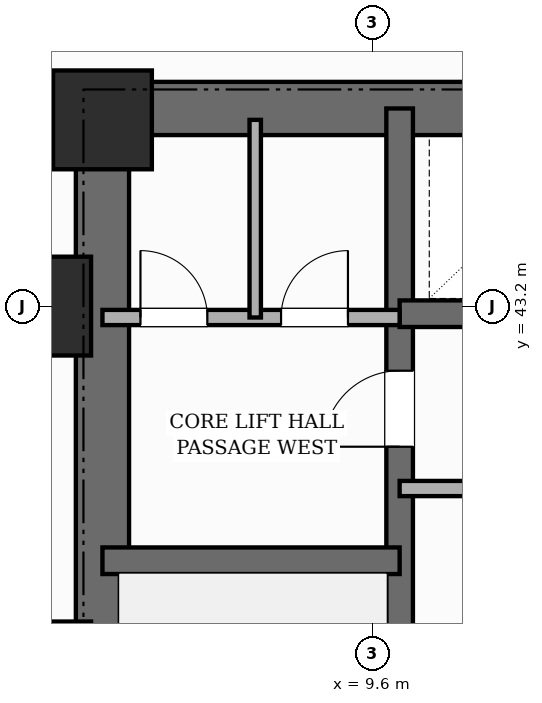
"""IFC4 building model, lengths in metres.
Left out: names, types, materials, properties, quantities, classifications, styles, units other than length and angle.
Written with IfcOpenShell. Run it as: python <this file> out.ifc"""

import sys

from ifc_helpers import new_model, si_unit, direction, frame, frame_2d, origin, origin_2d, place, context, subcontext, project, spatial, rectangle, extrude, element, fill, save


model = new_model("IFC4")
c1 = context("Model", 3, precision=1e-05, world=origin(), true_north=direction((0.0, 1.0)))
c2 = subcontext(c1, "Body", "Model", "MODEL_VIEW")
j1 = project(units=[si_unit("LENGTHUNIT", "METRE"), si_unit("PLANEANGLEUNIT", "RADIAN")], contexts=[c1])
p1 = place(None, origin())
s1 = spatial("IfcSite", under=j1, at=p1, CompositionType="ELEMENT")
p2 = place(p1, origin())
s2 = spatial("IfcBuilding", under=s1, at=p2, CompositionType="ELEMENT")
p3 = place(p2, frame((0.0, 0.0, 10.0)))
s3 = spatial("IfcBuildingStorey", under=s2, at=p3, CompositionType="ELEMENT", Elevation=10.0)
p4 = place(p3, frame((6.05, 30.55, 0.0), z_axis=(0.0, 0.0, 1.0), x_axis=(0.0, 1.0, 0.0)))
e1 = element("IfcWall", 1, at=p4, inside=s3, PredefinedType="SHEAR", context=c2, shape_type="SweptSolid", body=[
    extrude(rectangle(XDim=15.6, YDim=0.7, at=frame_2d((7.8, 0.0))), origin(), (0.0, 0.0, 1.0), 4.8),
])
p5 = place(p3, frame((6.05, 45.8, 0.0), z_axis=(0.0, 0.0, 1.0), x_axis=(1.0, 0.0, 0.0)))
e2 = element("IfcWall", 2, at=p5, inside=s3, PredefinedType="SHEAR", context=c2, shape_type="SweptSolid", body=[
    extrude(rectangle(XDim=16.7, YDim=0.7, at=frame_2d((8.35, 0.0))), origin(), (0.0, 0.0, 1.0), 4.8),
])
p6 = place(p3, frame((9.96, 30.9, 0.0), z_axis=(0.0, 0.0, 1.0), x_axis=(0.0, 1.0, 0.0)))
e3 = element("IfcWall", 3, at=p6, inside=s3, PredefinedType="SHEAR", context=c2, shape_type="SweptSolid", body=[
    extrude(rectangle(XDim=14.9, YDim=0.35, at=frame_2d((7.45, 0.0))), origin(), (0.0, 0.0, 1.0), 4.8),
])
p7 = place(p6, frame((0.65, 0.0, 0.0)))
e4 = element("IfcOpeningElement", 4, at=p7, cuts=e3, PredefinedType="OPENING", context=c2, shape_type="SweptSolid", body=[
    extrude(rectangle(XDim=0.95, YDim=2.1, at=frame_2d((0.475, 1.05))), frame((0.0, 0.185, 0.0), z_axis=(0.0, -1.0, 0.0), x_axis=(1.0, 0.0, 0.0)), (0.0, 0.0, 1.0), 0.37),
])
p8 = place(p6, frame((10.45, 0.0, 0.0)))
e5 = element("IfcOpeningElement", 5, at=p8, cuts=e3, PredefinedType="OPENING", context=c2, shape_type="SweptSolid", body=[
    extrude(rectangle(XDim=1.0, YDim=2.15, at=frame_2d((0.5, 1.075))), frame((0.0, 0.185, 0.0), z_axis=(0.0, -1.0, 0.0), x_axis=(1.0, 0.0, 0.0)), (0.0, 0.0, 1.0), 0.37),
])
p9 = place(p3, frame((6.05, 39.85, 0.0), z_axis=(0.0, 0.0, 1.0), x_axis=(1.0, 0.0, 0.0)))
e6 = element("IfcWall", 6, at=p9, inside=s3, PredefinedType="SHEAR", context=c2, shape_type="SweptSolid", body=[
    extrude(rectangle(XDim=3.91, YDim=0.35, at=frame_2d((1.955, 0.0))), origin(), (0.0, 0.0, 1.0), 4.8),
])
p10 = place(p3, frame((9.96, 43.1, 0.0), z_axis=(0.0, 0.0, 1.0), x_axis=(1.0, 0.0, 0.0)))
e7 = element("IfcWall", 7, at=p10, inside=s3, PredefinedType="SHEAR", context=c2, shape_type="SweptSolid", body=[
    extrude(rectangle(XDim=8.88, YDim=0.35, at=frame_2d((4.44, 0.0))), origin(), (0.0, 0.0, 1.0), 4.8),
])
for number, where, z_axis, x_axis in (
    (8, (5.25, 38.4, 0.0), (0.0, 0.0, 1.0), (1.0, 0.0, 0.0)),
    (9, (5.25, 43.2, 0.0), (0.0, 0.0, 1.0), (1.0, 0.0, 0.0)),
    (10, (6.05, 45.65, 0.0), (0.0, 0.0, 1.0), (1.0, 0.0, 0.0)),
):
    element("IfcColumn", number, at=place(p3, frame(where, z_axis=z_axis, x_axis=x_axis)), inside=s3, PredefinedType="COLUMN", context=c2, shape_type="SweptSolid", body=[
        extrude(rectangle(XDim=1.3, YDim=1.3, at=origin_2d()), origin(), (0.0, 0.0, 1.0), 4.8),
    ])
p11 = place(p3, frame((9.96, 40.8, 0.0), z_axis=(0.0, 0.0, 1.0), x_axis=(1.0, 0.0, 0.0)))
e11 = element("IfcWall", 11, at=p11, inside=s3, PredefinedType="POLYGONAL", context=c2, shape_type="SweptSolid", body=[
    extrude(rectangle(XDim=8.88, YDim=0.2, at=frame_2d((4.44, 0.0))), origin(), (0.0, 0.0, 1.0), 4.4),
])
p12 = place(p11, frame((7.5, 0.0, 0.0)))
e12 = element("IfcOpeningElement", 12, at=p12, cuts=e11, PredefinedType="OPENING", context=c2, shape_type="SweptSolid", body=[
    extrude(rectangle(XDim=0.88, YDim=2.1, at=frame_2d((0.44, 1.05))), frame((0.0, 0.11, 0.0), z_axis=(0.0, -1.0, 0.0), x_axis=(1.0, 0.0, 0.0)), (0.0, 0.0, 1.0), 0.22),
])
p13 = place(p11, frame((3.6, 0.0, 0.0)))
e13 = element("IfcOpeningElement", 13, at=p13, cuts=e11, PredefinedType="OPENING", context=c2, shape_type="SweptSolid", body=[
    extrude(rectangle(XDim=0.88, YDim=2.1, at=frame_2d((0.44, 1.05))), frame((0.0, 0.11, 0.0), z_axis=(0.0, -1.0, 0.0), x_axis=(1.0, 0.0, 0.0)), (0.0, 0.0, 1.0), 0.22),
])
p14 = place(p3, frame((6.05, 43.05, 0.0), z_axis=(0.0, 0.0, 1.0), x_axis=(1.0, 0.0, 0.0)))
e14 = element("IfcWall", 14, at=p14, inside=s3, PredefinedType="POLYGONAL", context=c2, shape_type="SweptSolid", body=[
    extrude(rectangle(XDim=3.91, YDim=0.2, at=frame_2d((1.955, 0.0))), origin(), (0.0, 0.0, 1.0), 3.48),
])
p15 = place(p14, frame((0.5, 0.0, 0.0)))
e15 = element("IfcOpeningElement", 15, at=p15, cuts=e14, PredefinedType="OPENING", context=c2, shape_type="SweptSolid", body=[
    extrude(rectangle(XDim=0.88, YDim=2.1, at=frame_2d((0.44, 1.05))), frame((0.0, 0.11, 0.0), z_axis=(0.0, -1.0, 0.0), x_axis=(1.0, 0.0, 0.0)), (0.0, 0.0, 1.0), 0.22),
])
p16 = place(p14, frame((2.35, 0.0, 0.0)))
e16 = element("IfcOpeningElement", 16, at=p16, cuts=e14, PredefinedType="OPENING", context=c2, shape_type="SweptSolid", body=[
    extrude(rectangle(XDim=0.88, YDim=2.1, at=frame_2d((0.44, 1.05))), frame((0.0, 0.11, 0.0), z_axis=(0.0, -1.0, 0.0), x_axis=(1.0, 0.0, 0.0)), (0.0, 0.0, 1.0), 0.22),
])
p17 = place(p3, frame((8.06, 43.05, 0.0), z_axis=(0.0, 0.0, 1.0), x_axis=(0.0, 1.0, 0.0)))
e17 = element("IfcWall", 17, at=p17, inside=s3, PredefinedType="PARTITIONING", context=c2, shape_type="SweptSolid", body=[
    extrude(rectangle(XDim=2.6, YDim=0.15, at=frame_2d((1.3, 0.0))), origin(), (0.0, 0.0, 1.0), 4.4),
])
p18 = place(p8, origin())
e18 = element("IfcDoor", 18, at=p18, inside=s3, OperationType="SINGLE_SWING_LEFT", PredefinedType="DOOR", context=c2, shape_type="SweptSolid", body=[
    extrude(rectangle(XDim=1.0, YDim=2.15, at=frame_2d((0.5, 1.075))), frame((0.0, 0.025, 0.0), z_axis=(0.0, -1.0, 0.0), x_axis=(1.0, 0.0, 0.0)), (0.0, 0.0, 1.0), 0.05),
])
fill(e5, e18)
p19 = place(p15, origin())
e19 = element("IfcDoor", 19, at=p19, inside=s3, OperationType="SINGLE_SWING_LEFT", PredefinedType="DOOR", context=c2, shape_type="SweptSolid", body=[
    extrude(rectangle(XDim=0.88, YDim=2.1, at=frame_2d((0.44, 1.05))), frame((0.0, 0.025, 0.0), z_axis=(0.0, -1.0, 0.0), x_axis=(1.0, 0.0, 0.0)), (0.0, 0.0, 1.0), 0.05),
])
fill(e15, e19)
p20 = place(p16, origin())
e20 = element("IfcDoor", 20, at=p20, inside=s3, OperationType="SINGLE_SWING_RIGHT", PredefinedType="DOOR", context=c2, shape_type="SweptSolid", body=[
    extrude(rectangle(XDim=0.88, YDim=2.1, at=frame_2d((0.44, 1.05))), frame((0.0, 0.025, 0.0), z_axis=(0.0, -1.0, 0.0), x_axis=(1.0, 0.0, 0.0)), (0.0, 0.0, 1.0), 0.05),
])
fill(e16, e20)
save(model, sys.argv[1])
